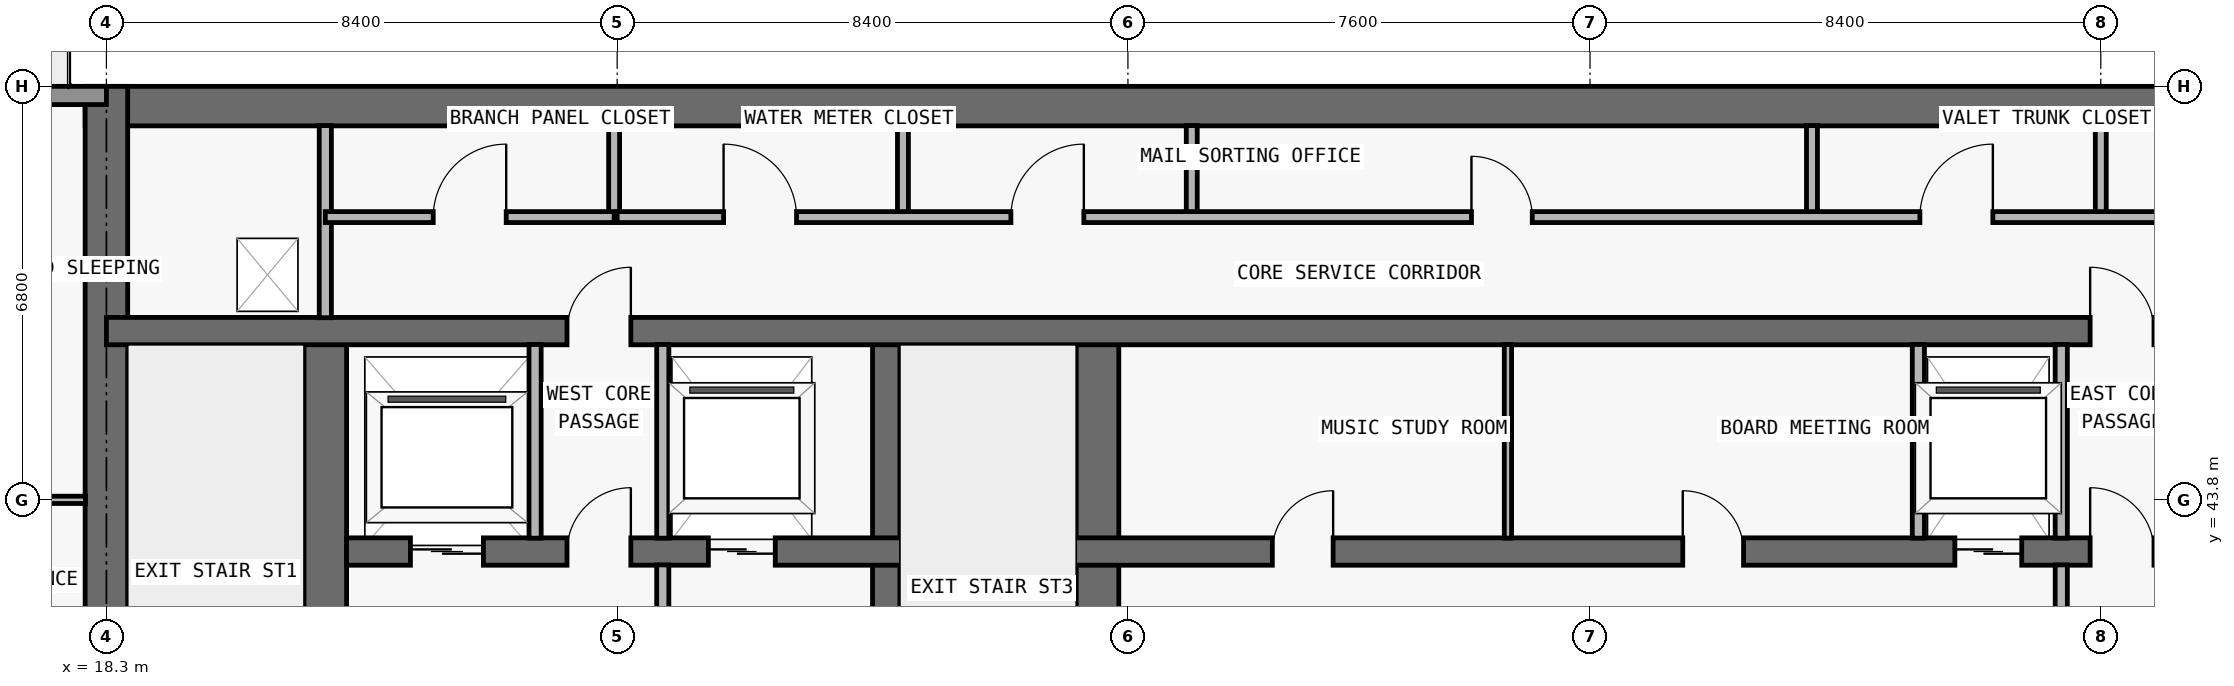
"""IFC4 building model, lengths in metres.
Left out: names, types, materials, properties, quantities, classifications, styles, units other than length and angle.
Written with IfcOpenShell. Run it as: python <this file> out.ifc"""

import sys

from ifc_helpers import new_model, si_unit, direction, frame, frame_2d, origin, place, context, subcontext, project, spatial, rectangle, extrude, element, fill, save


model = new_model("IFC4")
c1 = context("Model", 3, precision=1e-05, world=origin(), true_north=direction((0.0, 1.0)))
c2 = subcontext(c1, "Body", "Model", "MODEL_VIEW")
j1 = project(units=[si_unit("LENGTHUNIT", "METRE"), si_unit("PLANEANGLEUNIT", "RADIAN")], contexts=[c1])
p1 = place(None, origin())
s1 = spatial("IfcSite", under=j1, at=p1, CompositionType="ELEMENT")
p2 = place(p1, origin())
s2 = spatial("IfcBuilding", under=s1, at=p2, CompositionType="ELEMENT")
p3 = place(p2, frame((0.0, 0.0, 211.5)))
s3 = spatial("IfcBuildingStorey", under=s2, at=p3, CompositionType="ELEMENT", Elevation=211.5)
p4 = place(p3, frame((17.95, 50.275, 0.0), z_axis=(0.0, 0.0, 1.0), x_axis=(1.0, 0.0, 0.0)))
e1 = element("IfcWall", 1, at=p4, inside=s3, PredefinedType="SHEAR", context=c2, shape_type="SweptSolid", body=[
    extrude(rectangle(XDim=41.9, YDim=0.65, at=frame_2d((20.95, 0.0))), origin(), (0.0, 0.0, 1.0), 3.05),
])
p5 = place(p3, frame((18.3, 36.65, 0.0), z_axis=(0.0, 0.0, 1.0), x_axis=(0.0, 1.0, 0.0)))
e2 = element("IfcWall", 2, at=p5, inside=s3, PredefinedType="SHEAR", context=c2, shape_type="SweptSolid", body=[
    extrude(rectangle(XDim=13.95, YDim=0.7, at=frame_2d((6.975, 0.0))), origin(), (0.0, 0.0, 1.0), 3.05),
])
p6 = place(p3, frame((21.9, 37.0, 0.0), z_axis=(0.0, 0.0, 1.0), x_axis=(0.0, 1.0, 0.0)))
e3 = element("IfcWall", 3, at=p6, inside=s3, PredefinedType="SHEAR", context=c2, shape_type="SweptSolid", body=[
    extrude(rectangle(XDim=9.575, YDim=0.7, at=frame_2d((4.788, 0.0))), origin(), (0.0, 0.0, 1.0), 3.05),
])
p7 = place(p6, frame((0.55, 0.0, 0.0)))
e4 = element("IfcOpeningElement", 4, at=p7, cuts=e3, PredefinedType="OPENING", context=c2, shape_type="SweptSolid", body=[
    extrude(rectangle(XDim=1.1, YDim=2.15, at=frame_2d((0.55, 1.075))), frame((0.0, 0.36, 0.0), z_axis=(0.0, -1.0, 0.0), x_axis=(1.0, 0.0, 0.0)), (0.0, 0.0, 1.0), 0.72),
])
p8 = place(p3, frame((31.125, 37.0, 0.0), z_axis=(0.0, 0.0, 1.0), x_axis=(0.0, 1.0, 0.0)))
e5 = element("IfcWall", 5, at=p8, inside=s3, PredefinedType="SHEAR", context=c2, shape_type="SweptSolid", body=[
    extrude(rectangle(XDim=9.575, YDim=0.45, at=frame_2d((4.788, 0.0))), origin(), (0.0, 0.0, 1.0), 3.05),
])
p9 = place(p3, frame((34.6, 37.0, 0.0), z_axis=(0.0, 0.0, 1.0), x_axis=(0.0, 1.0, 0.0)))
e6 = element("IfcWall", 6, at=p9, inside=s3, PredefinedType="SHEAR", context=c2, shape_type="SweptSolid", body=[
    extrude(rectangle(XDim=9.575, YDim=0.7, at=frame_2d((4.788, 0.0))), origin(), (0.0, 0.0, 1.0), 3.05),
])
p10 = place(p3, frame((22.25, 42.95, 0.0), z_axis=(0.0, 0.0, 1.0), x_axis=(1.0, 0.0, 0.0)))
e7 = element("IfcWall", 7, at=p10, inside=s3, PredefinedType="SHEAR", context=c2, shape_type="SweptSolid", body=[
    extrude(rectangle(XDim=33.3, YDim=0.45, at=frame_2d((16.65, 0.0))), origin(), (0.0, 0.0, 1.0), 3.05),
])
p11 = place(p10, frame((1.05, 0.0, 0.0)))
e8 = element("IfcOpeningElement", 8, at=p11, cuts=e7, PredefinedType="OPENING", context=c2, shape_type="SweptSolid", body=[
    extrude(rectangle(XDim=1.2, YDim=2.2, at=frame_2d((0.6, 1.1))), frame((0.0, 0.235, 0.0), z_axis=(0.0, -1.0, 0.0), x_axis=(1.0, 0.0, 0.0)), (0.0, 0.0, 1.0), 0.47),
])
p12 = place(p10, frame((31.05, 0.0, 0.0)))
e9 = element("IfcOpeningElement", 9, at=p12, cuts=e7, PredefinedType="OPENING", context=c2, shape_type="SweptSolid", body=[
    extrude(rectangle(XDim=1.2, YDim=2.2, at=frame_2d((0.6, 1.1))), frame((0.0, 0.235, 0.0), z_axis=(0.0, -1.0, 0.0), x_axis=(1.0, 0.0, 0.0)), (0.0, 0.0, 1.0), 0.47),
])
p13 = place(p10, frame((26.45, 0.0, 0.0)))
e10 = element("IfcOpeningElement", 10, at=p13, cuts=e7, PredefinedType="OPENING", context=c2, shape_type="SweptSolid", body=[
    extrude(rectangle(XDim=1.1, YDim=2.2, at=frame_2d((0.55, 1.1))), frame((0.0, 0.235, 0.0), z_axis=(0.0, -1.0, 0.0), x_axis=(1.0, 0.0, 0.0)), (0.0, 0.0, 1.0), 0.47),
])
p14 = place(p10, frame((5.95, 0.0, 0.0)))
e11 = element("IfcOpeningElement", 11, at=p14, cuts=e7, PredefinedType="OPENING", context=c2, shape_type="SweptSolid", body=[
    extrude(rectangle(XDim=1.1, YDim=2.2, at=frame_2d((0.55, 1.1))), frame((0.0, 0.235, 0.0), z_axis=(0.0, -1.0, 0.0), x_axis=(1.0, 0.0, 0.0)), (0.0, 0.0, 1.0), 0.47),
])
p15 = place(p10, frame((3.625, 0.0, 0.0)))
e12 = element("IfcOpeningElement", 12, at=p15, cuts=e7, PredefinedType="OPENING", context=c2, shape_type="SweptSolid", body=[
    extrude(rectangle(XDim=1.05, YDim=2.15, at=frame_2d((0.525, 1.075))), frame((0.0, 0.235, 0.0), z_axis=(0.0, -1.0, 0.0), x_axis=(1.0, 0.0, 0.0)), (0.0, 0.0, 1.0), 0.47),
])
p16 = place(p10, frame((28.675, 0.0, 0.0)))
e13 = element("IfcOpeningElement", 13, at=p16, cuts=e7, PredefinedType="OPENING", context=c2, shape_type="SweptSolid", body=[
    extrude(rectangle(XDim=1.05, YDim=2.15, at=frame_2d((0.525, 1.075))), frame((0.0, 0.235, 0.0), z_axis=(0.0, -1.0, 0.0), x_axis=(1.0, 0.0, 0.0)), (0.0, 0.0, 1.0), 0.47),
])
p17 = place(p10, frame((15.225, 0.0, 0.0)))
e14 = element("IfcOpeningElement", 14, at=p17, cuts=e7, PredefinedType="OPENING", context=c2, shape_type="SweptSolid", body=[
    extrude(rectangle(XDim=1.0, YDim=2.2, at=frame_2d((0.5, 1.1))), frame((0.0, 0.235, 0.0), z_axis=(0.0, -1.0, 0.0), x_axis=(1.0, 0.0, 0.0)), (0.0, 0.0, 1.0), 0.47),
])
p18 = place(p10, frame((21.975, 0.0, 0.0)))
e15 = element("IfcOpeningElement", 15, at=p18, cuts=e7, PredefinedType="OPENING", context=c2, shape_type="SweptSolid", body=[
    extrude(rectangle(XDim=1.0, YDim=2.2, at=frame_2d((0.5, 1.1))), frame((0.0, 0.235, 0.0), z_axis=(0.0, -1.0, 0.0), x_axis=(1.0, 0.0, 0.0)), (0.0, 0.0, 1.0), 0.47),
])
p19 = place(p3, frame((18.3, 46.575, 0.0), z_axis=(0.0, 0.0, 1.0), x_axis=(1.0, 0.0, 0.0)))
e16 = element("IfcWall", 16, at=p19, inside=s3, PredefinedType="SHEAR", context=c2, shape_type="SweptSolid", body=[
    extrude(rectangle(XDim=41.2, YDim=0.45, at=frame_2d((20.6, 0.0))), origin(), (0.0, 0.0, 1.0), 3.05),
])
p20 = place(p19, frame((7.575, 0.0, 0.0)))
e17 = element("IfcOpeningElement", 17, at=p20, cuts=e16, PredefinedType="OPENING", context=c2, shape_type="SweptSolid", body=[
    extrude(rectangle(XDim=1.05, YDim=2.15, at=frame_2d((0.525, 1.075))), frame((0.0, 0.235, 0.0), z_axis=(0.0, -1.0, 0.0), x_axis=(1.0, 0.0, 0.0)), (0.0, 0.0, 1.0), 0.47),
])
p21 = place(p19, frame((32.625, 0.0, 0.0)))
e18 = element("IfcOpeningElement", 18, at=p21, cuts=e16, PredefinedType="OPENING", context=c2, shape_type="SweptSolid", body=[
    extrude(rectangle(XDim=1.05, YDim=2.15, at=frame_2d((0.525, 1.075))), frame((0.0, 0.235, 0.0), z_axis=(0.0, -1.0, 0.0), x_axis=(1.0, 0.0, 0.0)), (0.0, 0.0, 1.0), 0.47),
])
p22 = place(p3, frame((10.1, 50.45, 0.0), z_axis=(0.0, 0.0, 1.0), x_axis=(1.0, 0.0, 0.0)))
e19 = element("IfcWall", 19, at=p22, inside=s3, PredefinedType="STANDARD", context=c2, shape_type="SweptSolid", body=[
    extrude(rectangle(XDim=8.2, YDim=0.3, at=frame_2d((4.1, 0.0))), origin(), (0.0, 0.0, 1.0), 3.05),
])
p23 = place(p22, frame((3.1, 0.0, 0.0)))
e20 = element("IfcOpeningElement", 20, at=p23, cuts=e19, PredefinedType="OPENING", context=c2, shape_type="SweptSolid", body=[
    extrude(rectangle(XDim=2.0, YDim=2.3, at=frame_2d((1.0, 1.15))), frame((0.0, 0.16, 0.0), z_axis=(0.0, -1.0, 0.0), x_axis=(1.0, 0.0, 0.0)), (0.0, 0.0, 1.0), 0.32),
])
p24 = place(p3, frame((21.9, 46.795, 0.0), z_axis=(0.0, 0.0, 1.0), x_axis=(0.0, 1.0, 0.0)))
e21 = element("IfcWall", 21, at=p24, inside=s3, PredefinedType="PARTITIONING", context=c2, shape_type="SweptSolid", body=[
    extrude(rectangle(XDim=3.16, YDim=0.2, at=frame_2d((1.58, 0.0))), origin(), (0.0, 0.0, 1.0), 3.05),
])
p25 = place(p3, frame((25.35, 43.17, 0.0), z_axis=(0.0, 0.0, 1.0), x_axis=(0.0, 1.0, 0.0)))
e22 = element("IfcWall", 22, at=p25, inside=s3, PredefinedType="PARTITIONING", context=c2, shape_type="SweptSolid", body=[
    extrude(rectangle(XDim=3.185, YDim=0.2, at=frame_2d((1.593, 0.0))), origin(), (0.0, 0.0, 1.0), 3.05),
])
p26 = place(p3, frame((26.65, 48.45, 0.0), z_axis=(0.0, 0.0, 1.0), x_axis=(0.0, 1.0, 0.0)))
e23 = element("IfcWall", 23, at=p26, inside=s3, PredefinedType="PARTITIONING", context=c2, shape_type="SweptSolid", body=[
    extrude(rectangle(XDim=1.505, YDim=0.18, at=frame_2d((0.752, 0.0))), origin(), (0.0, 0.0, 1.0), 3.05),
])
p27 = place(p3, frame((27.45, 37.345, 0.0), z_axis=(0.0, 0.0, 1.0), x_axis=(0.0, 1.0, 0.0)))
e24 = element("IfcWall", 24, at=p27, inside=s3, PredefinedType="PARTITIONING", context=c2, shape_type="SweptSolid", body=[
    extrude(rectangle(XDim=5.385, YDim=0.2, at=frame_2d((2.692, 0.0))), origin(), (0.0, 0.0, 1.0), 3.05),
])
p28 = place(p3, frame((27.45, 43.17, 0.0), z_axis=(0.0, 0.0, 1.0), x_axis=(0.0, 1.0, 0.0)))
e25 = element("IfcWall", 25, at=p28, inside=s3, PredefinedType="PARTITIONING", context=c2, shape_type="SweptSolid", body=[
    extrude(rectangle(XDim=3.185, YDim=0.2, at=frame_2d((1.593, 0.0))), origin(), (0.0, 0.0, 1.0), 3.05),
])
for number, where, z_axis, x_axis in (
    (26, (31.4, 48.45, 0.0), (0.0, 0.0, 1.0), (0.0, 1.0, 0.0)),
    (27, (36.15, 48.45, 0.0), (0.0, 0.0, 1.0), (0.0, 1.0, 0.0)),
):
    element("IfcWall", number, at=place(p3, frame(where, z_axis=z_axis, x_axis=x_axis)), inside=s3, PredefinedType="PARTITIONING", context=c2, shape_type="SweptSolid", body=[
        extrude(rectangle(XDim=1.505, YDim=0.18, at=frame_2d((0.752, 0.0))), origin(), (0.0, 0.0, 1.0), 3.05),
    ])
p29 = place(p3, frame((41.35, 43.17, 0.0), z_axis=(0.0, 0.0, 1.0), x_axis=(0.0, 1.0, 0.0)))
e28 = element("IfcWall", 28, at=p29, inside=s3, PredefinedType="PARTITIONING", context=c2, shape_type="SweptSolid", body=[
    extrude(rectangle(XDim=3.185, YDim=0.12, at=frame_2d((1.593, 0.0))), origin(), (0.0, 0.0, 1.0), 3.05),
])
p30 = place(p3, frame((46.35, 48.45, 0.0), z_axis=(0.0, 0.0, 1.0), x_axis=(0.0, 1.0, 0.0)))
e29 = element("IfcWall", 29, at=p30, inside=s3, PredefinedType="PARTITIONING", context=c2, shape_type="SweptSolid", body=[
    extrude(rectangle(XDim=1.505, YDim=0.18, at=frame_2d((0.752, 0.0))), origin(), (0.0, 0.0, 1.0), 3.05),
])
p31 = place(p3, frame((48.1, 43.17, 0.0), z_axis=(0.0, 0.0, 1.0), x_axis=(0.0, 1.0, 0.0)))
e30 = element("IfcWall", 30, at=p31, inside=s3, PredefinedType="PARTITIONING", context=c2, shape_type="SweptSolid", body=[
    extrude(rectangle(XDim=3.185, YDim=0.2, at=frame_2d((1.593, 0.0))), origin(), (0.0, 0.0, 1.0), 3.05),
])
p32 = place(p3, frame((50.45, 37.345, 0.0), z_axis=(0.0, 0.0, 1.0), x_axis=(0.0, 1.0, 0.0)))
e31 = element("IfcWall", 31, at=p32, inside=s3, PredefinedType="PARTITIONING", context=c2, shape_type="SweptSolid", body=[
    extrude(rectangle(XDim=5.385, YDim=0.2, at=frame_2d((2.692, 0.0))), origin(), (0.0, 0.0, 1.0), 3.05),
])
p33 = place(p3, frame((50.45, 43.17, 0.0), z_axis=(0.0, 0.0, 1.0), x_axis=(0.0, 1.0, 0.0)))
e32 = element("IfcWall", 32, at=p33, inside=s3, PredefinedType="PARTITIONING", context=c2, shape_type="SweptSolid", body=[
    extrude(rectangle(XDim=3.185, YDim=0.2, at=frame_2d((1.593, 0.0))), origin(), (0.0, 0.0, 1.0), 3.05),
])
p34 = place(p3, frame((51.1, 48.45, 0.0), z_axis=(0.0, 0.0, 1.0), x_axis=(0.0, 1.0, 0.0)))
e33 = element("IfcWall", 33, at=p34, inside=s3, PredefinedType="PARTITIONING", context=c2, shape_type="SweptSolid", body=[
    extrude(rectangle(XDim=1.505, YDim=0.18, at=frame_2d((0.752, 0.0))), origin(), (0.0, 0.0, 1.0), 3.05),
])
p35 = place(p3, frame((6.395, 43.8, 0.0), z_axis=(0.0, 0.0, 1.0), x_axis=(1.0, 0.0, 0.0)))
e34 = element("IfcWall", 34, at=p35, inside=s3, PredefinedType="PARTITIONING", context=c2, shape_type="SweptSolid", body=[
    extrude(rectangle(XDim=11.56, YDim=0.12, at=frame_2d((5.78, 0.0))), origin(), (0.0, 0.0, 1.0), 2.418),
])
p36 = place(p35, frame((7.251, 0.0, 0.0)))
e35 = element("IfcOpeningElement", 35, at=p36, cuts=e34, PredefinedType="OPENING", context=c2, shape_type="SweptSolid", body=[
    extrude(rectangle(XDim=0.9, YDim=2.15, at=frame_2d((0.45, 1.075))), frame((0.0, 0.07, 0.0), z_axis=(0.0, -1.0, 0.0), x_axis=(1.0, 0.0, 0.0)), (0.0, 0.0, 1.0), 0.14),
])
p37 = place(p35, frame((9.982, 0.0, 0.0)))
e36 = element("IfcOpeningElement", 36, at=p37, cuts=e34, PredefinedType="OPENING", context=c2, shape_type="SweptSolid", body=[
    extrude(rectangle(XDim=0.85, YDim=2.1, at=frame_2d((0.425, 1.05))), frame((0.0, 0.07, 0.0), z_axis=(0.0, -1.0, 0.0), x_axis=(1.0, 0.0, 0.0)), (0.0, 0.0, 1.0), 0.14),
])
p38 = place(p3, frame((21.9, 48.45, 0.0), z_axis=(0.0, 0.0, 1.0), x_axis=(1.0, 0.0, 0.0)))
e37 = element("IfcWall", 37, at=p38, inside=s3, PredefinedType="PARTITIONING", context=c2, shape_type="SweptSolid", body=[
    extrude(rectangle(XDim=4.75, YDim=0.18, at=frame_2d((2.375, 0.0))), origin(), (0.0, 0.0, 1.0), 3.05),
])
p39 = place(p38, frame((1.775, 0.0, 0.0)))
e38 = element("IfcOpeningElement", 38, at=p39, cuts=e37, PredefinedType="OPENING", context=c2, shape_type="SweptSolid", body=[
    extrude(rectangle(XDim=1.2, YDim=2.2, at=frame_2d((0.6, 1.1))), frame((0.0, 0.1, 0.0), z_axis=(0.0, -1.0, 0.0), x_axis=(1.0, 0.0, 0.0)), (0.0, 0.0, 1.0), 0.2),
])
p40 = place(p3, frame((26.7, 48.45, 0.0), z_axis=(0.0, 0.0, 1.0), x_axis=(1.0, 0.0, 0.0)))
e39 = element("IfcWall", 39, at=p40, inside=s3, PredefinedType="PARTITIONING", context=c2, shape_type="SweptSolid", body=[
    extrude(rectangle(XDim=29.2, YDim=0.18, at=frame_2d((14.6, 0.0))), origin(), (0.0, 0.0, 1.0), 3.05),
])
p41 = place(p40, frame((1.75, 0.0, 0.0)))
e40 = element("IfcOpeningElement", 40, at=p41, cuts=e39, PredefinedType="OPENING", context=c2, shape_type="SweptSolid", body=[
    extrude(rectangle(XDim=1.2, YDim=2.2, at=frame_2d((0.6, 1.1))), frame((0.0, 0.1, 0.0), z_axis=(0.0, -1.0, 0.0), x_axis=(1.0, 0.0, 0.0)), (0.0, 0.0, 1.0), 0.2),
])
p42 = place(p40, frame((6.475, 0.0, 0.0)))
e41 = element("IfcOpeningElement", 41, at=p42, cuts=e39, PredefinedType="OPENING", context=c2, shape_type="SweptSolid", body=[
    extrude(rectangle(XDim=1.2, YDim=2.2, at=frame_2d((0.6, 1.1))), frame((0.0, 0.1, 0.0), z_axis=(0.0, -1.0, 0.0), x_axis=(1.0, 0.0, 0.0)), (0.0, 0.0, 1.0), 0.2),
])
p43 = place(p40, frame((14.05, 0.0, 0.0)))
e42 = element("IfcOpeningElement", 42, at=p43, cuts=e39, PredefinedType="OPENING", context=c2, shape_type="SweptSolid", body=[
    extrude(rectangle(XDim=1.0, YDim=2.2, at=frame_2d((0.5, 1.1))), frame((0.0, 0.1, 0.0), z_axis=(0.0, -1.0, 0.0), x_axis=(1.0, 0.0, 0.0)), (0.0, 0.0, 1.0), 0.2),
])
p44 = place(p40, frame((21.425, 0.0, 0.0)))
e43 = element("IfcOpeningElement", 43, at=p44, cuts=e39, PredefinedType="OPENING", context=c2, shape_type="SweptSolid", body=[
    extrude(rectangle(XDim=1.2, YDim=2.2, at=frame_2d((0.6, 1.1))), frame((0.0, 0.1, 0.0), z_axis=(0.0, -1.0, 0.0), x_axis=(1.0, 0.0, 0.0)), (0.0, 0.0, 1.0), 0.2),
])
p45 = place(p40, frame((26.375, 0.0, 0.0)))
e44 = element("IfcOpeningElement", 44, at=p45, cuts=e39, PredefinedType="OPENING", context=c2, shape_type="SweptSolid", body=[
    extrude(rectangle(XDim=0.85, YDim=2.1, at=frame_2d((0.425, 1.05))), frame((0.0, 0.1, 0.0), z_axis=(0.0, -1.0, 0.0), x_axis=(1.0, 0.0, 0.0)), (0.0, 0.0, 1.0), 0.2),
])
p46 = place(p11, origin())
e45 = element("IfcDoor", 45, at=p46, inside=s3, OperationType="DOUBLE_DOOR_SLIDING", PredefinedType="DOOR", context=c2, shape_type="SweptSolid", body=[
    extrude(rectangle(XDim=1.2, YDim=2.2, at=frame_2d((0.6, 1.1))), frame((0.0, 0.025, 0.0), z_axis=(0.0, -1.0, 0.0), x_axis=(1.0, 0.0, 0.0)), (0.0, 0.0, 1.0), 0.05),
])
fill(e8, e45)
p47 = place(p13, origin())
e46 = element("IfcDoor", 46, at=p47, inside=s3, OperationType="DOUBLE_DOOR_SLIDING", PredefinedType="DOOR", context=c2, shape_type="SweptSolid", body=[
    extrude(rectangle(XDim=1.1, YDim=2.2, at=frame_2d((0.55, 1.1))), frame((0.0, 0.025, 0.0), z_axis=(0.0, -1.0, 0.0), x_axis=(1.0, 0.0, 0.0)), (0.0, 0.0, 1.0), 0.05),
])
fill(e10, e46)
p48 = place(p14, origin())
e47 = element("IfcDoor", 47, at=p48, inside=s3, OperationType="DOUBLE_DOOR_SLIDING", PredefinedType="DOOR", context=c2, shape_type="SweptSolid", body=[
    extrude(rectangle(XDim=1.1, YDim=2.2, at=frame_2d((0.55, 1.1))), frame((0.0, 0.025, 0.0), z_axis=(0.0, -1.0, 0.0), x_axis=(1.0, 0.0, 0.0)), (0.0, 0.0, 1.0), 0.05),
])
fill(e11, e47)
p49 = place(p15, origin())
e48 = element("IfcDoor", 48, at=p49, inside=s3, OperationType="SINGLE_SWING_RIGHT", PredefinedType="DOOR", context=c2, shape_type="SweptSolid", body=[
    extrude(rectangle(XDim=1.05, YDim=2.15, at=frame_2d((0.525, 1.075))), frame((0.0, 0.025, 0.0), z_axis=(0.0, -1.0, 0.0), x_axis=(1.0, 0.0, 0.0)), (0.0, 0.0, 1.0), 0.05),
])
fill(e12, e48)
p50 = place(p16, origin())
e49 = element("IfcDoor", 49, at=p50, inside=s3, OperationType="SINGLE_SWING_LEFT", PredefinedType="DOOR", context=c2, shape_type="SweptSolid", body=[
    extrude(rectangle(XDim=1.05, YDim=2.15, at=frame_2d((0.525, 1.075))), frame((0.0, 0.025, 0.0), z_axis=(0.0, -1.0, 0.0), x_axis=(1.0, 0.0, 0.0)), (0.0, 0.0, 1.0), 0.05),
])
fill(e13, e49)
p51 = place(p17, origin())
e50 = element("IfcDoor", 50, at=p51, inside=s3, OperationType="SINGLE_SWING_RIGHT", PredefinedType="DOOR", context=c2, shape_type="SweptSolid", body=[
    extrude(rectangle(XDim=1.0, YDim=2.2, at=frame_2d((0.5, 1.1))), frame((0.0, 0.025, 0.0), z_axis=(0.0, -1.0, 0.0), x_axis=(1.0, 0.0, 0.0)), (0.0, 0.0, 1.0), 0.05),
])
fill(e14, e50)
p52 = place(p18, origin())
e51 = element("IfcDoor", 51, at=p52, inside=s3, OperationType="SINGLE_SWING_LEFT", PredefinedType="DOOR", context=c2, shape_type="SweptSolid", body=[
    extrude(rectangle(XDim=1.0, YDim=2.2, at=frame_2d((0.5, 1.1))), frame((0.0, 0.025, 0.0), z_axis=(0.0, -1.0, 0.0), x_axis=(1.0, 0.0, 0.0)), (0.0, 0.0, 1.0), 0.05),
])
fill(e15, e51)
p53 = place(p20, origin())
e52 = element("IfcDoor", 52, at=p53, inside=s3, OperationType="SINGLE_SWING_RIGHT", PredefinedType="DOOR", context=c2, shape_type="SweptSolid", body=[
    extrude(rectangle(XDim=1.05, YDim=2.15, at=frame_2d((0.525, 1.075))), frame((0.0, 0.025, 0.0), z_axis=(0.0, -1.0, 0.0), x_axis=(1.0, 0.0, 0.0)), (0.0, 0.0, 1.0), 0.05),
])
fill(e17, e52)
p54 = place(p21, origin())
e53 = element("IfcDoor", 53, at=p54, inside=s3, OperationType="SINGLE_SWING_LEFT", PredefinedType="DOOR", context=c2, shape_type="SweptSolid", body=[
    extrude(rectangle(XDim=1.05, YDim=2.15, at=frame_2d((0.525, 1.075))), frame((0.0, 0.025, 0.0), z_axis=(0.0, -1.0, 0.0), x_axis=(1.0, 0.0, 0.0)), (0.0, 0.0, 1.0), 0.05),
])
fill(e18, e53)
p55 = place(p39, origin())
e54 = element("IfcDoor", 54, at=p55, inside=s3, OperationType="SINGLE_SWING_RIGHT", PredefinedType="DOOR", context=c2, shape_type="SweptSolid", body=[
    extrude(rectangle(XDim=1.2, YDim=2.2, at=frame_2d((0.6, 1.1))), frame((0.0, 0.025, 0.0), z_axis=(0.0, -1.0, 0.0), x_axis=(1.0, 0.0, 0.0)), (0.0, 0.0, 1.0), 0.05),
])
fill(e38, e54)
p56 = place(p41, origin())
e55 = element("IfcDoor", 55, at=p56, inside=s3, OperationType="SINGLE_SWING_LEFT", PredefinedType="DOOR", context=c2, shape_type="SweptSolid", body=[
    extrude(rectangle(XDim=1.2, YDim=2.2, at=frame_2d((0.6, 1.1))), frame((0.0, 0.025, 0.0), z_axis=(0.0, -1.0, 0.0), x_axis=(1.0, 0.0, 0.0)), (0.0, 0.0, 1.0), 0.05),
])
fill(e40, e55)
p57 = place(p42, origin())
e56 = element("IfcDoor", 56, at=p57, inside=s3, OperationType="SINGLE_SWING_RIGHT", PredefinedType="DOOR", context=c2, shape_type="SweptSolid", body=[
    extrude(rectangle(XDim=1.2, YDim=2.2, at=frame_2d((0.6, 1.1))), frame((0.0, 0.025, 0.0), z_axis=(0.0, -1.0, 0.0), x_axis=(1.0, 0.0, 0.0)), (0.0, 0.0, 1.0), 0.05),
])
fill(e41, e56)
p58 = place(p43, origin())
e57 = element("IfcDoor", 57, at=p58, inside=s3, OperationType="SINGLE_SWING_LEFT", PredefinedType="DOOR", context=c2, shape_type="SweptSolid", body=[
    extrude(rectangle(XDim=1.0, YDim=2.2, at=frame_2d((0.5, 1.1))), frame((0.0, 0.025, 0.0), z_axis=(0.0, -1.0, 0.0), x_axis=(1.0, 0.0, 0.0)), (0.0, 0.0, 1.0), 0.05),
])
fill(e42, e57)
p59 = place(p44, origin())
e58 = element("IfcDoor", 58, at=p59, inside=s3, OperationType="SINGLE_SWING_RIGHT", PredefinedType="DOOR", context=c2, shape_type="SweptSolid", body=[
    extrude(rectangle(XDim=1.2, YDim=2.2, at=frame_2d((0.6, 1.1))), frame((0.0, 0.025, 0.0), z_axis=(0.0, -1.0, 0.0), x_axis=(1.0, 0.0, 0.0)), (0.0, 0.0, 1.0), 0.05),
])
fill(e43, e58)
save(model, sys.argv[1])
